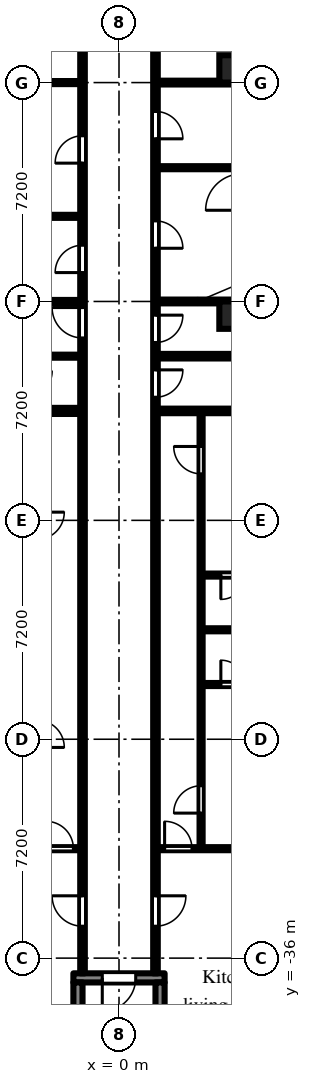
"""IFC4 building model, lengths in metres.
Left out: names, types, materials, properties, quantities, classifications, styles, units other than length and angle.
Written with IfcOpenShell. Run it as: python <this file> out.ifc"""

import sys

from ifc_helpers import new_model, si_unit, direction, frame, frame_2d, origin, origin_2d, place, context, subcontext, project, spatial, rectangle, extrude, element, fill, save


model = new_model("IFC4")
c1 = context("Model", 3, precision=1e-05, world=origin(), true_north=direction((0.0, 1.0)))
c2 = subcontext(c1, "Body", "Model", "MODEL_VIEW")
j1 = project(units=[si_unit("LENGTHUNIT", "METRE"), si_unit("PLANEANGLEUNIT", "RADIAN")], contexts=[c1])
p1 = place(None, origin())
s1 = spatial("IfcSite", under=j1, at=p1, CompositionType="ELEMENT")
p2 = place(p1, origin())
s2 = spatial("IfcBuilding", under=s1, at=p2, CompositionType="ELEMENT")
p3 = place(p2, frame((0.0, 0.0, 59.7)))
s3 = spatial("IfcBuildingStorey", under=s2, at=p3, CompositionType="ELEMENT", Elevation=59.7)
for number, where, z_axis, x_axis in (
    (1, (3.75, -14.85, 0.0), (0.0, 0.0, 1.0), (1.0, 0.0, 0.0)),
    (2, (3.75, -6.75, 0.0), (0.0, 0.0, 1.0), (1.0, 0.0, 0.0)),
):
    element("IfcColumn", number, at=place(p3, frame(where, z_axis=z_axis, x_axis=x_axis)), inside=s3, PredefinedType="COLUMN", context=c2, shape_type="SweptSolid", body=[
        extrude(rectangle(XDim=0.9, YDim=0.9, at=origin_2d()), origin(), (0.0, 0.0, 1.0), 3.0),
    ])
p4 = place(p3, frame((-1.5, -36.65, 0.0), z_axis=(0.0, 0.0, 1.0), x_axis=(1.0, 0.0, 0.0)))
e3 = element("IfcWall", 3, at=p4, inside=s3, PredefinedType="SHEAR", context=c2, shape_type="SweptSolid", body=[
    extrude(rectangle(XDim=3.0, YDim=0.3, at=frame_2d((1.5, 0.0))), origin(), (0.0, 0.0, 1.0), 2.55),
])
p5 = place(p4, frame((0.95, 0.0, 0.0)))
e4 = element("IfcOpeningElement", 4, at=p5, cuts=e3, PredefinedType="OPENING", context=c2, shape_type="SweptSolid", body=[
    extrude(rectangle(XDim=1.1, YDim=2.1, at=frame_2d((0.55, 1.05))), frame((0.0, 0.16, 0.0), z_axis=(0.0, -1.0, 0.0), x_axis=(1.0, 0.0, 0.0)), (0.0, 0.0, 1.0), 0.32),
])
for number, where, z_axis, x_axis in (
    (5, (-1.35, -36.8, 0.0), (0.0, 0.0, 1.0), (0.0, -1.0, 0.0)),
    (6, (1.35, -36.8, 0.0), (0.0, 0.0, 1.0), (0.0, -1.0, 0.0)),
):
    element("IfcWall", number, at=place(p3, frame(where, z_axis=z_axis, x_axis=x_axis)), inside=s3, PredefinedType="SHEAR", context=c2, shape_type="SweptSolid", body=[
        extrude(rectangle(XDim=5.8, YDim=0.3, at=frame_2d((2.9, 0.0))), origin(), (0.0, 0.0, 1.0), 2.55),
    ])
p6 = place(p3, frame((-6.9, -32.4, 0.0), z_axis=(0.0, 0.0, 1.0), x_axis=(1.0, 0.0, 0.0)))
e7 = element("IfcWall", 7, at=p6, inside=s3, PredefinedType="PARTITIONING", context=c2, shape_type="SweptSolid", body=[
    extrude(rectangle(XDim=5.625, YDim=0.1, at=frame_2d((2.812, 0.0))), origin(), (0.0, 0.0, 1.0), 2.55),
])
p7 = place(p6, frame((4.5, 0.0, 0.0)))
e8 = element("IfcOpeningElement", 8, at=p7, cuts=e7, PredefinedType="OPENING", context=c2, shape_type="SweptSolid", body=[
    extrude(rectangle(XDim=0.9, YDim=2.1, at=frame_2d((0.45, 1.05))), frame((0.0, 0.06, 0.0), z_axis=(0.0, -1.0, 0.0), x_axis=(1.0, 0.0, 0.0)), (0.0, 0.0, 1.0), 0.12),
])
for number, where, z_axis, x_axis in (
    (9, (-3.9, -14.4, 0.0), (0.0, 0.0, 1.0), (1.0, 0.0, 0.0)),
    (10, (-3.9, -11.6, 0.0), (0.0, 0.0, 1.0), (1.0, 0.0, 0.0)),
    (11, (-3.9, -7.2, 0.0), (0.0, 0.0, 1.0), (1.0, 0.0, 0.0)),
):
    element("IfcWall", number, at=place(p3, frame(where, z_axis=z_axis, x_axis=x_axis)), inside=s3, PredefinedType="PARTITIONING", context=c2, shape_type="SweptSolid", body=[
        extrude(rectangle(XDim=2.625, YDim=0.1, at=frame_2d((1.312, 0.0))), origin(), (0.0, 0.0, 1.0), 2.55),
    ])
p8 = place(p3, frame((-2.95, -16.2, 0.0), z_axis=(0.0, 0.0, 1.0), x_axis=(1.0, 0.0, 0.0)))
e12 = element("IfcWall", 12, at=p8, inside=s3, PredefinedType="PARTITIONING", context=c2, shape_type="SweptSolid", body=[
    extrude(rectangle(XDim=1.675, YDim=0.1, at=frame_2d((0.837, 0.0))), origin(), (0.0, 0.0, 1.0), 2.55),
])
p9 = place(p3, frame((-2.75, -18.0, 0.0), z_axis=(0.0, 0.0, 1.0), x_axis=(1.0, 0.0, 0.0)))
e13 = element("IfcWall", 13, at=p9, inside=s3, PredefinedType="PARTITIONING", context=c2, shape_type="SweptSolid", body=[
    extrude(rectangle(XDim=1.475, YDim=0.2, at=frame_2d((0.738, 0.0))), origin(), (0.0, 0.0, 1.0), 2.55),
])
p10 = place(p3, frame((-1.2, -36.5, 0.0), z_axis=(0.0, 0.0, 1.0), x_axis=(0.0, 1.0, 0.0)))
e14 = element("IfcWall", 14, at=p10, inside=s3, PredefinedType="PARTITIONING", context=c2, shape_type="SweptSolid", body=[
    extrude(rectangle(XDim=35.225, YDim=0.15, at=frame_2d((17.613, 0.0))), origin(), (0.0, 0.0, 1.0), 2.55),
])
p11 = place(p10, frame((31.85, 0.0, 0.0)))
e15 = element("IfcOpeningElement", 15, at=p11, cuts=e14, PredefinedType="OPENING", context=c2, shape_type="SweptSolid", body=[
    extrude(rectangle(XDim=0.9, YDim=2.1, at=frame_2d((0.45, 1.05))), frame((0.0, 0.085, 0.0), z_axis=(0.0, -1.0, 0.0), x_axis=(1.0, 0.0, 0.0)), (0.0, 0.0, 1.0), 0.17),
])
p12 = place(p10, frame((23.05, 0.0, 0.0)))
e16 = element("IfcOpeningElement", 16, at=p12, cuts=e14, PredefinedType="OPENING", context=c2, shape_type="SweptSolid", body=[
    extrude(rectangle(XDim=0.9, YDim=2.1, at=frame_2d((0.45, 1.05))), frame((0.0, 0.085, 0.0), z_axis=(0.0, -1.0, 0.0), x_axis=(1.0, 0.0, 0.0)), (0.0, 0.0, 1.0), 0.17),
])
p13 = place(p10, frame((26.65, 0.0, 0.0)))
e17 = element("IfcOpeningElement", 17, at=p13, cuts=e14, PredefinedType="OPENING", context=c2, shape_type="SweptSolid", body=[
    extrude(rectangle(XDim=0.9, YDim=2.1, at=frame_2d((0.45, 1.05))), frame((0.0, 0.085, 0.0), z_axis=(0.0, -1.0, 0.0), x_axis=(1.0, 0.0, 0.0)), (0.0, 0.0, 1.0), 0.17),
])
p14 = place(p10, frame((20.9, 0.0, 0.0)))
e18 = element("IfcOpeningElement", 18, at=p14, cuts=e14, PredefinedType="OPENING", context=c2, shape_type="SweptSolid", body=[
    extrude(rectangle(XDim=1.0, YDim=2.1, at=frame_2d((0.5, 1.05))), frame((0.0, 0.085, 0.0), z_axis=(0.0, -1.0, 0.0), x_axis=(1.0, 0.0, 0.0)), (0.0, 0.0, 1.0), 0.17),
])
p15 = place(p10, frame((1.55, 0.0, 0.0)))
e19 = element("IfcOpeningElement", 19, at=p15, cuts=e14, PredefinedType="OPENING", context=c2, shape_type="SweptSolid", body=[
    extrude(rectangle(XDim=1.0, YDim=2.1, at=frame_2d((0.5, 1.05))), frame((0.0, 0.085, 0.0), z_axis=(0.0, -1.0, 0.0), x_axis=(1.0, 0.0, 0.0)), (0.0, 0.0, 1.0), 0.17),
])
p16 = place(p3, frame((1.2, -36.5, 0.0), z_axis=(0.0, 0.0, 1.0), x_axis=(0.0, 1.0, 0.0)))
e20 = element("IfcWall", 20, at=p16, inside=s3, PredefinedType="PARTITIONING", context=c2, shape_type="SweptSolid", body=[
    extrude(rectangle(XDim=35.375, YDim=0.15, at=frame_2d((17.688, 0.0))), origin(), (0.0, 0.0, 1.0), 2.55),
])
p17 = place(p16, frame((33.65, 0.0, 0.0)))
e21 = element("IfcOpeningElement", 21, at=p17, cuts=e20, PredefinedType="OPENING", context=c2, shape_type="SweptSolid", body=[
    extrude(rectangle(XDim=0.9, YDim=2.1, at=frame_2d((0.45, 1.05))), frame((0.0, 0.085, 0.0), z_axis=(0.0, -1.0, 0.0), x_axis=(1.0, 0.0, 0.0)), (0.0, 0.0, 1.0), 0.17),
])
p18 = place(p16, frame((30.65, 0.0, 0.0)))
e22 = element("IfcOpeningElement", 22, at=p18, cuts=e20, PredefinedType="OPENING", context=c2, shape_type="SweptSolid", body=[
    extrude(rectangle(XDim=0.9, YDim=2.1, at=frame_2d((0.45, 1.05))), frame((0.0, 0.085, 0.0), z_axis=(0.0, -1.0, 0.0), x_axis=(1.0, 0.0, 0.0)), (0.0, 0.0, 1.0), 0.17),
])
p19 = place(p16, frame((27.45, 0.0, 0.0)))
e23 = element("IfcOpeningElement", 23, at=p19, cuts=e20, PredefinedType="OPENING", context=c2, shape_type="SweptSolid", body=[
    extrude(rectangle(XDim=0.9, YDim=2.1, at=frame_2d((0.45, 1.05))), frame((0.0, 0.085, 0.0), z_axis=(0.0, -1.0, 0.0), x_axis=(1.0, 0.0, 0.0)), (0.0, 0.0, 1.0), 0.17),
])
p20 = place(p16, frame((23.85, 0.0, 0.0)))
e24 = element("IfcOpeningElement", 24, at=p20, cuts=e20, PredefinedType="OPENING", context=c2, shape_type="SweptSolid", body=[
    extrude(rectangle(XDim=0.9, YDim=2.1, at=frame_2d((0.45, 1.05))), frame((0.0, 0.085, 0.0), z_axis=(0.0, -1.0, 0.0), x_axis=(1.0, 0.0, 0.0)), (0.0, 0.0, 1.0), 0.17),
])
p21 = place(p16, frame((20.75, 0.0, 0.0)))
e25 = element("IfcOpeningElement", 25, at=p21, cuts=e20, PredefinedType="OPENING", context=c2, shape_type="SweptSolid", body=[
    extrude(rectangle(XDim=0.9, YDim=2.1, at=frame_2d((0.45, 1.05))), frame((0.0, 0.085, 0.0), z_axis=(0.0, -1.0, 0.0), x_axis=(1.0, 0.0, 0.0)), (0.0, 0.0, 1.0), 0.17),
])
p22 = place(p16, frame((18.95, 0.0, 0.0)))
e26 = element("IfcOpeningElement", 26, at=p22, cuts=e20, PredefinedType="OPENING", context=c2, shape_type="SweptSolid", body=[
    extrude(rectangle(XDim=0.9, YDim=2.1, at=frame_2d((0.45, 1.05))), frame((0.0, 0.085, 0.0), z_axis=(0.0, -1.0, 0.0), x_axis=(1.0, 0.0, 0.0)), (0.0, 0.0, 1.0), 0.17),
])
p23 = place(p16, frame((1.55, 0.0, 0.0)))
e27 = element("IfcOpeningElement", 27, at=p23, cuts=e20, PredefinedType="OPENING", context=c2, shape_type="SweptSolid", body=[
    extrude(rectangle(XDim=1.0, YDim=2.1, at=frame_2d((0.5, 1.05))), frame((0.0, 0.085, 0.0), z_axis=(0.0, -1.0, 0.0), x_axis=(1.0, 0.0, 0.0)), (0.0, 0.0, 1.0), 0.17),
])
p24 = place(p3, frame((1.275, -32.4, 0.0), z_axis=(0.0, 0.0, 1.0), x_axis=(1.0, 0.0, 0.0)))
e28 = element("IfcWall", 28, at=p24, inside=s3, PredefinedType="PARTITIONING", context=c2, shape_type="SweptSolid", body=[
    extrude(rectangle(XDim=5.625, YDim=0.1, at=frame_2d((2.812, 0.0))), origin(), (0.0, 0.0, 1.0), 2.55),
])
p25 = place(p24, frame((0.225, 0.0, 0.0)))
e29 = element("IfcOpeningElement", 29, at=p25, cuts=e28, PredefinedType="OPENING", context=c2, shape_type="SweptSolid", body=[
    extrude(rectangle(XDim=0.9, YDim=2.1, at=frame_2d((0.45, 1.05))), frame((0.0, 0.06, 0.0), z_axis=(0.0, -1.0, 0.0), x_axis=(1.0, 0.0, 0.0)), (0.0, 0.0, 1.0), 0.12),
])
for number, where, z_axis, x_axis in (
    (30, (1.275, -18.0, 0.0), (0.0, 0.0, 1.0), (1.0, 0.0, 0.0)),
    (31, (1.275, -16.2, 0.0), (0.0, 0.0, 1.0), (1.0, 0.0, 0.0)),
):
    element("IfcWall", number, at=place(p3, frame(where, z_axis=z_axis, x_axis=x_axis)), inside=s3, PredefinedType="PARTITIONING", context=c2, shape_type="SweptSolid", body=[
        extrude(rectangle(XDim=5.625, YDim=0.15, at=frame_2d((2.812, 0.0))), origin(), (0.0, 0.0, 1.0), 2.55),
    ])
p26 = place(p3, frame((1.275, -14.4, 0.0), z_axis=(0.0, 0.0, 1.0), x_axis=(1.0, 0.0, 0.0)))
e32 = element("IfcWall", 32, at=p26, inside=s3, PredefinedType="PARTITIONING", context=c2, shape_type="SweptSolid", body=[
    extrude(rectangle(XDim=2.625, YDim=0.125, at=frame_2d((1.312, 0.0))), origin(), (0.0, 0.0, 1.0), 2.55),
])
p27 = place(p3, frame((1.275, -10.0, 0.0), z_axis=(0.0, 0.0, 1.0), x_axis=(1.0, 0.0, 0.0)))
e33 = element("IfcWall", 33, at=p27, inside=s3, PredefinedType="PARTITIONING", context=c2, shape_type="SweptSolid", body=[
    extrude(rectangle(XDim=2.625, YDim=0.1, at=frame_2d((1.312, 0.0))), origin(), (0.0, 0.0, 1.0), 2.55),
])
p28 = place(p3, frame((1.275, -7.2, 0.0), z_axis=(0.0, 0.0, 1.0), x_axis=(1.0, 0.0, 0.0)))
e34 = element("IfcWall", 34, at=p28, inside=s3, PredefinedType="PARTITIONING", context=c2, shape_type="SweptSolid", body=[
    extrude(rectangle(XDim=2.625, YDim=0.125, at=frame_2d((1.312, 0.0))), origin(), (0.0, 0.0, 1.0), 2.55),
])
p29 = place(p3, frame((2.7, -32.35, 0.0), z_axis=(0.0, 0.0, 1.0), x_axis=(0.0, 1.0, 0.0)))
e35 = element("IfcWall", 35, at=p29, inside=s3, PredefinedType="PARTITIONING", context=c2, shape_type="SweptSolid", body=[
    extrude(rectangle(XDim=14.275, YDim=0.1, at=frame_2d((7.138, 0.0))), origin(), (0.0, 0.0, 1.0), 2.55),
])
p30 = place(p29, frame((1.12, 0.0, 0.0)))
e36 = element("IfcOpeningElement", 36, at=p30, cuts=e35, PredefinedType="OPENING", context=c2, shape_type="SweptSolid", body=[
    extrude(rectangle(XDim=0.9, YDim=2.1, at=frame_2d((0.45, 1.05))), frame((0.0, 0.06, 0.0), z_axis=(0.0, -1.0, 0.0), x_axis=(1.0, 0.0, 0.0)), (0.0, 0.0, 1.0), 0.12),
])
p31 = place(p29, frame((12.28, 0.0, 0.0)))
e37 = element("IfcOpeningElement", 37, at=p31, cuts=e35, PredefinedType="OPENING", context=c2, shape_type="SweptSolid", body=[
    extrude(rectangle(XDim=0.9, YDim=2.1, at=frame_2d((0.45, 1.05))), frame((0.0, 0.06, 0.0), z_axis=(0.0, -1.0, 0.0), x_axis=(1.0, 0.0, 0.0)), (0.0, 0.0, 1.0), 0.12),
])
p32 = place(p3, frame((2.75, -27.0, 0.0), z_axis=(0.0, 0.0, 1.0), x_axis=(1.0, 0.0, 0.0)))
e38 = element("IfcWall", 38, at=p32, inside=s3, PredefinedType="PARTITIONING", context=c2, shape_type="SweptSolid", body=[
    extrude(rectangle(XDim=2.1, YDim=0.1, at=frame_2d((1.05, 0.0))), origin(), (0.0, 0.0, 1.0), 2.55),
])
p33 = place(p32, frame((0.6, 0.0, 0.0)))
e39 = element("IfcOpeningElement", 39, at=p33, cuts=e38, PredefinedType="OPENING", context=c2, shape_type="SweptSolid", body=[
    extrude(rectangle(XDim=0.8, YDim=2.1, at=frame_2d((0.4, 1.05))), frame((0.0, 0.06, 0.0), z_axis=(0.0, -1.0, 0.0), x_axis=(1.0, 0.0, 0.0)), (0.0, 0.0, 1.0), 0.12),
])
p34 = place(p3, frame((2.75, -25.2, 0.0), z_axis=(0.0, 0.0, 1.0), x_axis=(1.0, 0.0, 0.0)))
e40 = element("IfcWall", 40, at=p34, inside=s3, PredefinedType="PARTITIONING", context=c2, shape_type="SweptSolid", body=[
    extrude(rectangle(XDim=4.15, YDim=0.1, at=frame_2d((2.075, 0.0))), origin(), (0.0, 0.0, 1.0), 2.55),
])
p35 = place(p3, frame((2.75, -23.4, 0.0), z_axis=(0.0, 0.0, 1.0), x_axis=(1.0, 0.0, 0.0)))
e41 = element("IfcWall", 41, at=p35, inside=s3, PredefinedType="PARTITIONING", context=c2, shape_type="SweptSolid", body=[
    extrude(rectangle(XDim=2.1, YDim=0.1, at=frame_2d((1.05, 0.0))), origin(), (0.0, 0.0, 1.0), 2.55),
])
p36 = place(p35, frame((0.6, 0.0, 0.0)))
e42 = element("IfcOpeningElement", 42, at=p36, cuts=e41, PredefinedType="OPENING", context=c2, shape_type="SweptSolid", body=[
    extrude(rectangle(XDim=0.8, YDim=2.1, at=frame_2d((0.4, 1.05))), frame((0.0, 0.06, 0.0), z_axis=(0.0, -1.0, 0.0), x_axis=(1.0, 0.0, 0.0)), (0.0, 0.0, 1.0), 0.12),
])
p37 = place(p5, frame((1.1, 0.0, 0.0), z_axis=(0.0, 0.0, 1.0), x_axis=(-1.0, 0.0, 0.0)))
e43 = element("IfcDoor", 43, at=p37, inside=s3, OperationType="SINGLE_SWING_RIGHT", PredefinedType="DOOR", context=c2, shape_type="SweptSolid", body=[
    extrude(rectangle(XDim=1.1, YDim=2.1, at=frame_2d((0.55, 1.05))), frame((0.0, 0.025, 0.0), z_axis=(0.0, -1.0, 0.0), x_axis=(1.0, 0.0, 0.0)), (0.0, 0.0, 1.0), 0.05),
])
fill(e4, e43)
p38 = place(p19, frame((0.9, 0.0, 0.0), z_axis=(0.0, 0.0, 1.0), x_axis=(-1.0, 0.0, 0.0)))
e44 = element("IfcDoor", 44, at=p38, inside=s3, OperationType="SINGLE_SWING_RIGHT", PredefinedType="DOOR", context=c2, shape_type="SweptSolid", body=[
    extrude(rectangle(XDim=0.9, YDim=2.1, at=frame_2d((0.45, 1.05))), frame((0.0, 0.025, 0.0), z_axis=(0.0, -1.0, 0.0), x_axis=(1.0, 0.0, 0.0)), (0.0, 0.0, 1.0), 0.05),
])
fill(e23, e44)
p39 = place(p20, frame((0.9, 0.0, 0.0), z_axis=(0.0, 0.0, 1.0), x_axis=(-1.0, 0.0, 0.0)))
e45 = element("IfcDoor", 45, at=p39, inside=s3, OperationType="SINGLE_SWING_RIGHT", PredefinedType="DOOR", context=c2, shape_type="SweptSolid", body=[
    extrude(rectangle(XDim=0.9, YDim=2.1, at=frame_2d((0.45, 1.05))), frame((0.0, 0.025, 0.0), z_axis=(0.0, -1.0, 0.0), x_axis=(1.0, 0.0, 0.0)), (0.0, 0.0, 1.0), 0.05),
])
fill(e24, e45)
p40 = place(p21, frame((0.9, 0.0, 0.0), z_axis=(0.0, 0.0, 1.0), x_axis=(-1.0, 0.0, 0.0)))
e46 = element("IfcDoor", 46, at=p40, inside=s3, OperationType="SINGLE_SWING_LEFT", PredefinedType="DOOR", context=c2, shape_type="SweptSolid", body=[
    extrude(rectangle(XDim=0.9, YDim=2.1, at=frame_2d((0.45, 1.05))), frame((0.0, 0.025, 0.0), z_axis=(0.0, -1.0, 0.0), x_axis=(1.0, 0.0, 0.0)), (0.0, 0.0, 1.0), 0.05),
])
fill(e25, e46)
p41 = place(p22, frame((0.9, 0.0, 0.0), z_axis=(0.0, 0.0, 1.0), x_axis=(-1.0, 0.0, 0.0)))
e47 = element("IfcDoor", 47, at=p41, inside=s3, OperationType="SINGLE_SWING_LEFT", PredefinedType="DOOR", context=c2, shape_type="SweptSolid", body=[
    extrude(rectangle(XDim=0.9, YDim=2.1, at=frame_2d((0.45, 1.05))), frame((0.0, 0.025, 0.0), z_axis=(0.0, -1.0, 0.0), x_axis=(1.0, 0.0, 0.0)), (0.0, 0.0, 1.0), 0.05),
])
fill(e26, e47)
p42 = place(p23, frame((1.0, 0.0, 0.0), z_axis=(0.0, 0.0, 1.0), x_axis=(-1.0, 0.0, 0.0)))
e48 = element("IfcDoor", 48, at=p42, inside=s3, OperationType="SINGLE_SWING_LEFT", PredefinedType="DOOR", context=c2, shape_type="SweptSolid", body=[
    extrude(rectangle(XDim=1.0, YDim=2.1, at=frame_2d((0.5, 1.05))), frame((0.0, 0.025, 0.0), z_axis=(0.0, -1.0, 0.0), x_axis=(1.0, 0.0, 0.0)), (0.0, 0.0, 1.0), 0.05),
])
fill(e27, e48)
p43 = place(p25, origin())
e49 = element("IfcDoor", 49, at=p43, inside=s3, OperationType="SINGLE_SWING_LEFT", PredefinedType="DOOR", context=c2, shape_type="SweptSolid", body=[
    extrude(rectangle(XDim=0.9, YDim=2.1, at=frame_2d((0.45, 1.05))), frame((0.0, 0.025, 0.0), z_axis=(0.0, -1.0, 0.0), x_axis=(1.0, 0.0, 0.0)), (0.0, 0.0, 1.0), 0.05),
])
fill(e29, e49)
p44 = place(p30, origin())
e50 = element("IfcDoor", 50, at=p44, inside=s3, OperationType="SINGLE_SWING_LEFT", PredefinedType="DOOR", context=c2, shape_type="SweptSolid", body=[
    extrude(rectangle(XDim=0.9, YDim=2.1, at=frame_2d((0.45, 1.05))), frame((0.0, 0.025, 0.0), z_axis=(0.0, -1.0, 0.0), x_axis=(1.0, 0.0, 0.0)), (0.0, 0.0, 1.0), 0.05),
])
fill(e36, e50)
p45 = place(p31, origin())
e51 = element("IfcDoor", 51, at=p45, inside=s3, OperationType="SINGLE_SWING_RIGHT", PredefinedType="DOOR", context=c2, shape_type="SweptSolid", body=[
    extrude(rectangle(XDim=0.9, YDim=2.1, at=frame_2d((0.45, 1.05))), frame((0.0, 0.025, 0.0), z_axis=(0.0, -1.0, 0.0), x_axis=(1.0, 0.0, 0.0)), (0.0, 0.0, 1.0), 0.05),
])
fill(e37, e51)
p46 = place(p36, frame((0.8, 0.0, 0.0), z_axis=(0.0, 0.0, 1.0), x_axis=(-1.0, 0.0, 0.0)))
e52 = element("IfcDoor", 52, at=p46, inside=s3, OperationType="SINGLE_SWING_RIGHT", PredefinedType="DOOR", context=c2, shape_type="SweptSolid", body=[
    extrude(rectangle(XDim=0.8, YDim=2.1, at=frame_2d((0.4, 1.05))), frame((0.0, 0.025, 0.0), z_axis=(0.0, -1.0, 0.0), x_axis=(1.0, 0.0, 0.0)), (0.0, 0.0, 1.0), 0.05),
])
fill(e42, e52)
p47 = place(p33, origin())
e53 = element("IfcDoor", 53, at=p47, inside=s3, OperationType="SINGLE_SWING_LEFT", PredefinedType="DOOR", context=c2, shape_type="SweptSolid", body=[
    extrude(rectangle(XDim=0.8, YDim=2.1, at=frame_2d((0.4, 1.05))), frame((0.0, 0.025, 0.0), z_axis=(0.0, -1.0, 0.0), x_axis=(1.0, 0.0, 0.0)), (0.0, 0.0, 1.0), 0.05),
])
fill(e39, e53)
p48 = place(p12, origin())
e54 = element("IfcDoor", 54, at=p48, inside=s3, OperationType="SINGLE_SWING_LEFT", PredefinedType="DOOR", context=c2, shape_type="SweptSolid", body=[
    extrude(rectangle(XDim=0.9, YDim=2.1, at=frame_2d((0.45, 1.05))), frame((0.0, 0.025, 0.0), z_axis=(0.0, -1.0, 0.0), x_axis=(1.0, 0.0, 0.0)), (0.0, 0.0, 1.0), 0.05),
])
fill(e16, e54)
p49 = place(p13, origin())
e55 = element("IfcDoor", 55, at=p49, inside=s3, OperationType="SINGLE_SWING_LEFT", PredefinedType="DOOR", context=c2, shape_type="SweptSolid", body=[
    extrude(rectangle(XDim=0.9, YDim=2.1, at=frame_2d((0.45, 1.05))), frame((0.0, 0.025, 0.0), z_axis=(0.0, -1.0, 0.0), x_axis=(1.0, 0.0, 0.0)), (0.0, 0.0, 1.0), 0.05),
])
fill(e17, e55)
p50 = place(p14, origin())
e56 = element("IfcDoor", 56, at=p50, inside=s3, OperationType="SINGLE_SWING_RIGHT", PredefinedType="DOOR", context=c2, shape_type="SweptSolid", body=[
    extrude(rectangle(XDim=1.0, YDim=2.1, at=frame_2d((0.5, 1.05))), frame((0.0, 0.025, 0.0), z_axis=(0.0, -1.0, 0.0), x_axis=(1.0, 0.0, 0.0)), (0.0, 0.0, 1.0), 0.05),
])
fill(e18, e56)
p51 = place(p15, origin())
e57 = element("IfcDoor", 57, at=p51, inside=s3, OperationType="SINGLE_SWING_RIGHT", PredefinedType="DOOR", context=c2, shape_type="SweptSolid", body=[
    extrude(rectangle(XDim=1.0, YDim=2.1, at=frame_2d((0.5, 1.05))), frame((0.0, 0.025, 0.0), z_axis=(0.0, -1.0, 0.0), x_axis=(1.0, 0.0, 0.0)), (0.0, 0.0, 1.0), 0.05),
])
fill(e19, e57)
p52 = place(p7, origin())
e58 = element("IfcDoor", 58, at=p52, inside=s3, OperationType="SINGLE_SWING_LEFT", PredefinedType="DOOR", context=c2, shape_type="SweptSolid", body=[
    extrude(rectangle(XDim=0.9, YDim=2.1, at=frame_2d((0.45, 1.05))), frame((0.0, 0.025, 0.0), z_axis=(0.0, -1.0, 0.0), x_axis=(1.0, 0.0, 0.0)), (0.0, 0.0, 1.0), 0.05),
])
fill(e8, e58)
save(model, sys.argv[1])
